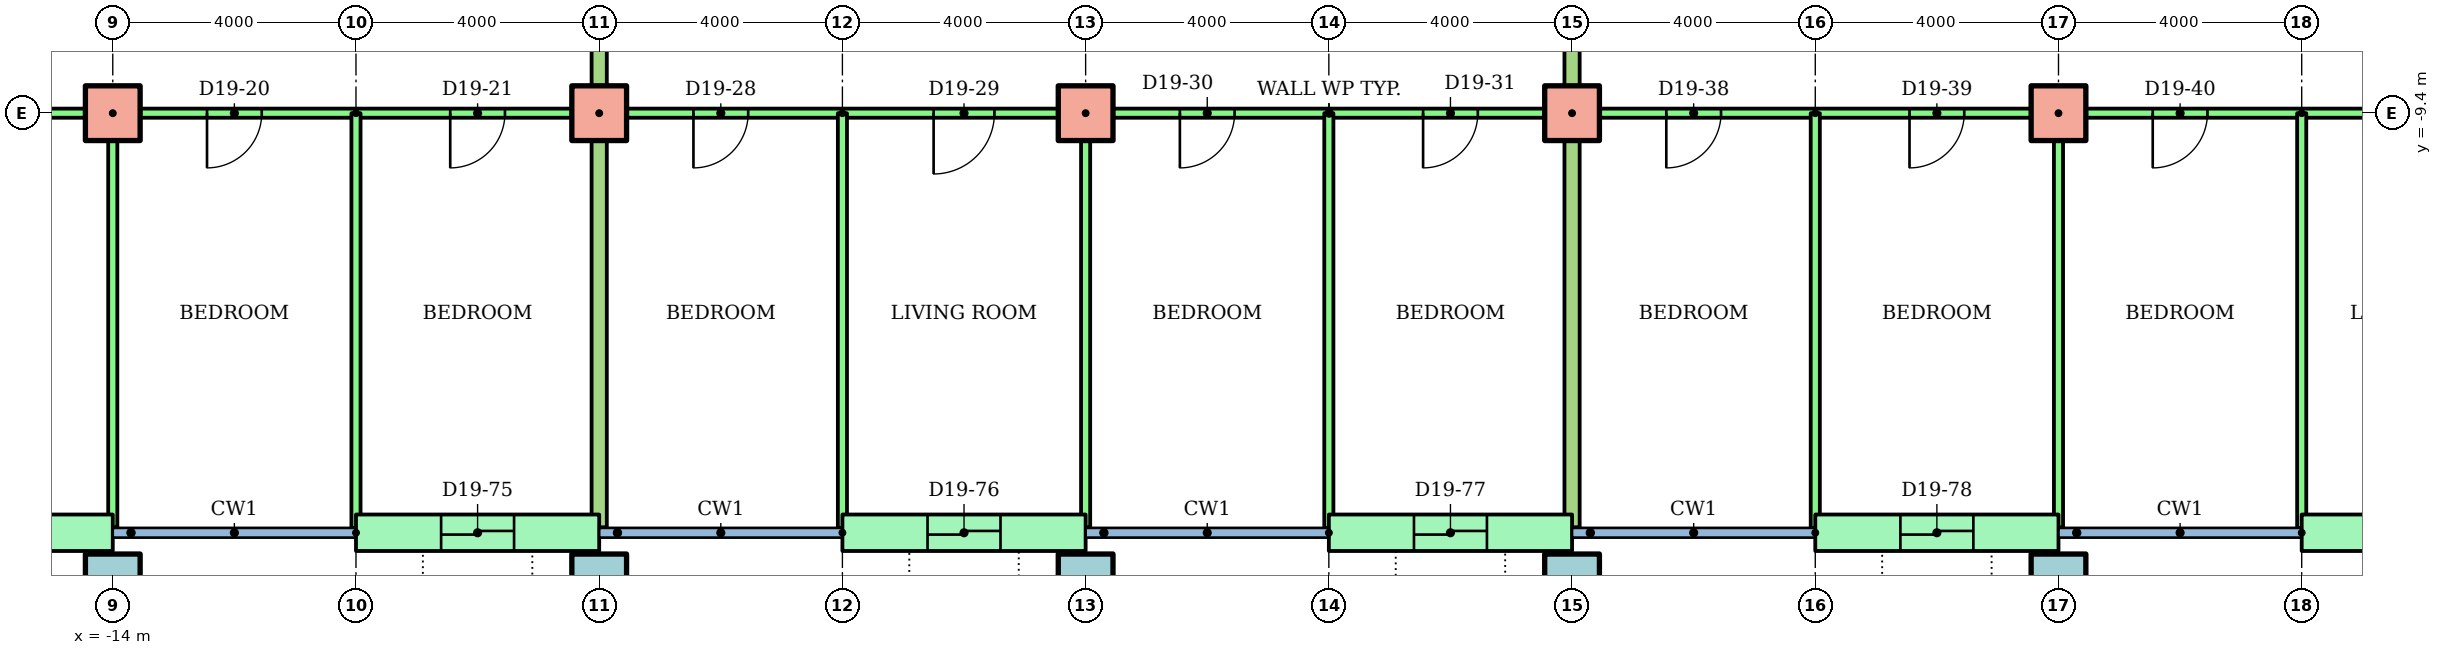
"""IFC4 building model, lengths in metres.
Left out: names, types, materials, properties, quantities, classifications, styles, units other than length and angle.
Written with IfcOpenShell. Run it as: python <this file> out.ifc"""

import sys

from ifc_helpers import new_model, si_unit, direction, frame, frame_2d, origin, origin_2d, place, context, subcontext, project, spatial, rectangle, hollow_rectangle, extrude, element, fill, save


model = new_model("IFC4")
c1 = context("Model", 3, precision=1e-05, world=origin(), true_north=direction((0.0, 1.0)))
c2 = subcontext(c1, "Body", "Model", "MODEL_VIEW")
j1 = project(units=[si_unit("LENGTHUNIT", "METRE"), si_unit("PLANEANGLEUNIT", "RADIAN")], contexts=[c1])
p1 = place(None, origin())
s1 = spatial("IfcSite", under=j1, at=p1, CompositionType="ELEMENT")
p2 = place(p1, origin())
s2 = spatial("IfcBuilding", under=s1, at=p2, CompositionType="ELEMENT")
p3 = place(p2, frame((0.0, 0.0, 77.5)))
s3 = spatial("IfcBuildingStorey", under=s2, at=p3, CompositionType="ELEMENT", Elevation=77.5)
for number, where in (
    (1, (-14.0, -17.1, 0.0)),
    (2, (-6.0, -17.1, 0.0)),
    (3, (2.0, -17.1, 0.0)),
    (4, (10.0, -17.1, 0.0)),
    (5, (18.0, -17.1, 0.0)),
):
    element("IfcColumn", number, at=place(p3, frame(where)), inside=s3, PredefinedType="COLUMN", context=c2, shape_type="SweptSolid", body=[
        extrude(hollow_rectangle(XDim=0.9, YDim=0.9, WallThickness=0.045, at=origin_2d()), origin(), (0.0, 0.0, 1.0), 3.2),
    ])
for number, where in (
    (6, (-14.0, -9.4, 0.0)),
    (7, (-6.0, -9.4, 0.0)),
    (8, (2.0, -9.4, 0.0)),
    (9, (10.0, -9.4, 0.0)),
    (10, (18.0, -9.4, 0.0)),
):
    element("IfcColumn", number, at=place(p3, frame(where)), inside=s3, PredefinedType="COLUMN", context=c2, shape_type="SweptSolid", body=[
        extrude(rectangle(XDim=0.9, YDim=0.9, at=origin_2d()), origin(), (0.0, 0.0, 1.0), 3.2),
    ])
p4 = place(p3, frame((-18.0, -16.3, 0.0)))
e11 = element("IfcWall", 11, at=p4, inside=s3, PredefinedType="STANDARD", context=c2, shape_type="SweptSolid", body=[
    extrude(rectangle(XDim=4.0, YDim=0.6, at=frame_2d((2.0, 0.0))), origin(), (0.0, 0.0, 1.0), 2.92),
])
p5 = place(p4, frame((1.4, 0.0, 0.0)))
e12 = element("IfcOpeningElement", 12, at=p5, cuts=e11, PredefinedType="OPENING", context=c2, shape_type="SweptSolid", body=[
    extrude(rectangle(XDim=1.2, YDim=2.1, at=frame_2d((0.6, 1.05))), frame((0.0, 0.31, 0.0), z_axis=(0.0, -1.0, 0.0), x_axis=(1.0, 0.0, 0.0)), (0.0, 0.0, 1.0), 0.62),
])
p6 = place(p3, frame((-10.0, -16.3, 0.0)))
e13 = element("IfcWall", 13, at=p6, inside=s3, PredefinedType="STANDARD", context=c2, shape_type="SweptSolid", body=[
    extrude(rectangle(XDim=4.0, YDim=0.6, at=frame_2d((2.0, 0.0))), origin(), (0.0, 0.0, 1.0), 2.92),
])
p7 = place(p6, frame((1.4, 0.0, 0.0)))
e14 = element("IfcOpeningElement", 14, at=p7, cuts=e13, PredefinedType="OPENING", context=c2, shape_type="SweptSolid", body=[
    extrude(rectangle(XDim=1.2, YDim=2.1, at=frame_2d((0.6, 1.05))), frame((0.0, 0.31, 0.0), z_axis=(0.0, -1.0, 0.0), x_axis=(1.0, 0.0, 0.0)), (0.0, 0.0, 1.0), 0.62),
])
p8 = place(p3, frame((-2.0, -16.3, 0.0)))
e15 = element("IfcWall", 15, at=p8, inside=s3, PredefinedType="STANDARD", context=c2, shape_type="SweptSolid", body=[
    extrude(rectangle(XDim=4.0, YDim=0.6, at=frame_2d((2.0, 0.0))), origin(), (0.0, 0.0, 1.0), 2.92),
])
p9 = place(p8, frame((1.4, 0.0, 0.0)))
e16 = element("IfcOpeningElement", 16, at=p9, cuts=e15, PredefinedType="OPENING", context=c2, shape_type="SweptSolid", body=[
    extrude(rectangle(XDim=1.2, YDim=2.1, at=frame_2d((0.6, 1.05))), frame((0.0, 0.31, 0.0), z_axis=(0.0, -1.0, 0.0), x_axis=(1.0, 0.0, 0.0)), (0.0, 0.0, 1.0), 0.62),
])
p10 = place(p3, frame((6.0, -16.3, 0.0)))
e17 = element("IfcWall", 17, at=p10, inside=s3, PredefinedType="STANDARD", context=c2, shape_type="SweptSolid", body=[
    extrude(rectangle(XDim=4.0, YDim=0.6, at=frame_2d((2.0, 0.0))), origin(), (0.0, 0.0, 1.0), 2.92),
])
p11 = place(p10, frame((1.4, 0.0, 0.0)))
e18 = element("IfcOpeningElement", 18, at=p11, cuts=e17, PredefinedType="OPENING", context=c2, shape_type="SweptSolid", body=[
    extrude(rectangle(XDim=1.2, YDim=2.1, at=frame_2d((0.6, 1.05))), frame((0.0, 0.31, 0.0), z_axis=(0.0, -1.0, 0.0), x_axis=(1.0, 0.0, 0.0)), (0.0, 0.0, 1.0), 0.62),
])
p12 = place(p3, frame((14.0, -16.3, 0.0)))
e19 = element("IfcWall", 19, at=p12, inside=s3, PredefinedType="STANDARD", context=c2, shape_type="SweptSolid", body=[
    extrude(rectangle(XDim=4.0, YDim=0.6, at=frame_2d((2.0, 0.0))), origin(), (0.0, 0.0, 1.0), 2.92),
])
p13 = place(p12, frame((1.4, 0.0, 0.0)))
e20 = element("IfcOpeningElement", 20, at=p13, cuts=e19, PredefinedType="OPENING", context=c2, shape_type="SweptSolid", body=[
    extrude(rectangle(XDim=1.2, YDim=2.1, at=frame_2d((0.6, 1.05))), frame((0.0, 0.31, 0.0), z_axis=(0.0, -1.0, 0.0), x_axis=(1.0, 0.0, 0.0)), (0.0, 0.0, 1.0), 0.62),
])
p14 = place(p3, frame((22.0, -16.3, 0.0)))
e21 = element("IfcWall", 21, at=p14, inside=s3, PredefinedType="STANDARD", context=c2, shape_type="SweptSolid", body=[
    extrude(rectangle(XDim=4.0, YDim=0.6, at=frame_2d((2.0, 0.0))), origin(), (0.0, 0.0, 1.0), 2.92),
])
p15 = place(p14, frame((1.4, 0.0, 0.0)))
e22 = element("IfcOpeningElement", 22, at=p15, cuts=e21, PredefinedType="OPENING", context=c2, shape_type="SweptSolid", body=[
    extrude(rectangle(XDim=1.2, YDim=2.1, at=frame_2d((0.6, 1.05))), frame((0.0, 0.31, 0.0), z_axis=(0.0, -1.0, 0.0), x_axis=(1.0, 0.0, 0.0)), (0.0, 0.0, 1.0), 0.62),
])
p16 = place(p3, frame((-6.0, -9.4, 0.0), z_axis=(0.0, 0.0, 1.0), x_axis=(-1.0, 0.0, 0.0)))
e23 = element("IfcWall", 23, at=p16, inside=s3, PredefinedType="PARTITIONING", context=c2, shape_type="SweptSolid", body=[
    extrude(rectangle(XDim=22.61, YDim=0.15, at=frame_2d((11.305, 0.0))), origin(), (0.0, 0.0, 1.0), 2.4),
])
p17 = place(p16, frame((19.7, 0.0, 0.0)))
e24 = element("IfcOpeningElement", 24, at=p17, cuts=e23, PredefinedType="OPENING", context=c2, shape_type="SweptSolid", body=[
    extrude(rectangle(XDim=0.9, YDim=2.1, at=frame_2d((0.45, 1.05))), frame((0.0, 0.085, 0.0), z_axis=(0.0, -1.0, 0.0), x_axis=(1.0, 0.0, 0.0)), (0.0, 0.0, 1.0), 0.17),
])
p18 = place(p16, frame((12.45, 0.0, 0.0)))
e25 = element("IfcOpeningElement", 25, at=p18, cuts=e23, PredefinedType="OPENING", context=c2, shape_type="SweptSolid", body=[
    extrude(rectangle(XDim=1.0, YDim=2.1, at=frame_2d((0.5, 1.05))), frame((0.0, 0.085, 0.0), z_axis=(0.0, -1.0, 0.0), x_axis=(1.0, 0.0, 0.0)), (0.0, 0.0, 1.0), 0.17),
])
p19 = place(p16, frame((5.55, 0.0, 0.0)))
e26 = element("IfcOpeningElement", 26, at=p19, cuts=e23, PredefinedType="OPENING", context=c2, shape_type="SweptSolid", body=[
    extrude(rectangle(XDim=0.9, YDim=2.1, at=frame_2d((0.45, 1.05))), frame((0.0, 0.085, 0.0), z_axis=(0.0, -1.0, 0.0), x_axis=(1.0, 0.0, 0.0)), (0.0, 0.0, 1.0), 0.17),
])
p20 = place(p16, frame((1.55, 0.0, 0.0)))
e27 = element("IfcOpeningElement", 27, at=p20, cuts=e23, PredefinedType="OPENING", context=c2, shape_type="SweptSolid", body=[
    extrude(rectangle(XDim=0.9, YDim=2.1, at=frame_2d((0.45, 1.05))), frame((0.0, 0.085, 0.0), z_axis=(0.0, -1.0, 0.0), x_axis=(1.0, 0.0, 0.0)), (0.0, 0.0, 1.0), 0.17),
])
p21 = place(p3, frame((-14.0, -9.4, 0.0), z_axis=(0.0, 0.0, 1.0), x_axis=(0.0, -1.0, 0.0)))
e28 = element("IfcWall", 28, at=p21, inside=s3, PredefinedType="PARTITIONING", context=c2, shape_type="SweptSolid", body=[
    extrude(rectangle(XDim=6.81, YDim=0.15, at=frame_2d((3.405, 0.0))), origin(), (0.0, 0.0, 1.0), 2.4),
])
p22 = place(p3, frame((-10.0, -9.4, 0.0), z_axis=(0.0, 0.0, 1.0), x_axis=(0.0, -1.0, 0.0)))
e29 = element("IfcWall", 29, at=p22, inside=s3, PredefinedType="PARTITIONING", context=c2, shape_type="SweptSolid", body=[
    extrude(rectangle(XDim=6.821, YDim=0.15, at=frame_2d((3.411, 0.0))), origin(), (0.0, 0.0, 1.0), 2.4),
])
p23 = place(p3, frame((10.0, -9.4, 0.0), z_axis=(0.0, 0.0, 1.0), x_axis=(-1.0, 0.0, 0.0)))
e30 = element("IfcWall", 30, at=p23, inside=s3, PredefinedType="PARTITIONING", context=c2, shape_type="SweptSolid", body=[
    extrude(rectangle(XDim=16.0, YDim=0.15, at=frame_2d((8.0, 0.0))), origin(), (0.0, 0.0, 1.0), 2.4),
])
p24 = place(p23, frame((13.55, 0.0, 0.0)))
e31 = element("IfcOpeningElement", 31, at=p24, cuts=e30, PredefinedType="OPENING", context=c2, shape_type="SweptSolid", body=[
    extrude(rectangle(XDim=0.9, YDim=2.1, at=frame_2d((0.45, 1.05))), frame((0.0, 0.085, 0.0), z_axis=(0.0, -1.0, 0.0), x_axis=(1.0, 0.0, 0.0)), (0.0, 0.0, 1.0), 0.17),
])
p25 = place(p23, frame((9.5, 0.0, 0.0)))
e32 = element("IfcOpeningElement", 32, at=p25, cuts=e30, PredefinedType="OPENING", context=c2, shape_type="SweptSolid", body=[
    extrude(rectangle(XDim=1.0, YDim=2.1, at=frame_2d((0.5, 1.05))), frame((0.0, 0.085, 0.0), z_axis=(0.0, -1.0, 0.0), x_axis=(1.0, 0.0, 0.0)), (0.0, 0.0, 1.0), 0.17),
])
p26 = place(p23, frame((5.55, 0.0, 0.0)))
e33 = element("IfcOpeningElement", 33, at=p26, cuts=e30, PredefinedType="OPENING", context=c2, shape_type="SweptSolid", body=[
    extrude(rectangle(XDim=0.9, YDim=2.1, at=frame_2d((0.45, 1.05))), frame((0.0, 0.085, 0.0), z_axis=(0.0, -1.0, 0.0), x_axis=(1.0, 0.0, 0.0)), (0.0, 0.0, 1.0), 0.17),
])
p27 = place(p23, frame((1.55, 0.0, 0.0)))
e34 = element("IfcOpeningElement", 34, at=p27, cuts=e30, PredefinedType="OPENING", context=c2, shape_type="SweptSolid", body=[
    extrude(rectangle(XDim=0.9, YDim=2.1, at=frame_2d((0.45, 1.05))), frame((0.0, 0.085, 0.0), z_axis=(0.0, -1.0, 0.0), x_axis=(1.0, 0.0, 0.0)), (0.0, 0.0, 1.0), 0.17),
])
p28 = place(p3, frame((-2.0, -9.4, 0.0), z_axis=(0.0, 0.0, 1.0), x_axis=(0.0, -1.0, 0.0)))
e35 = element("IfcWall", 35, at=p28, inside=s3, PredefinedType="PARTITIONING", context=c2, shape_type="SweptSolid", body=[
    extrude(rectangle(XDim=6.821, YDim=0.15, at=frame_2d((3.411, 0.0))), origin(), (0.0, 0.0, 1.0), 2.4),
])
p29 = place(p3, frame((2.0, -9.4, 0.0), z_axis=(0.0, 0.0, 1.0), x_axis=(0.0, -1.0, 0.0)))
e36 = element("IfcWall", 36, at=p29, inside=s3, PredefinedType="PARTITIONING", context=c2, shape_type="SweptSolid", body=[
    extrude(rectangle(XDim=6.81, YDim=0.15, at=frame_2d((3.405, 0.0))), origin(), (0.0, 0.0, 1.0), 2.4),
])
p30 = place(p3, frame((6.0, -9.4, 0.0), z_axis=(0.0, 0.0, 1.0), x_axis=(0.0, -1.0, 0.0)))
e37 = element("IfcWall", 37, at=p30, inside=s3, PredefinedType="PARTITIONING", context=c2, shape_type="SweptSolid", body=[
    extrude(rectangle(XDim=6.821, YDim=0.15, at=frame_2d((3.411, 0.0))), origin(), (0.0, 0.0, 1.0), 2.4),
])
p31 = place(p3, frame((-6.0, -1.4, 0.0), z_axis=(0.0, 0.0, 1.0), x_axis=(0.0, -1.0, 0.0)))
e38 = element("IfcWall", 38, at=p31, inside=s3, PredefinedType="PARTITIONING", context=c2, shape_type="SweptSolid", body=[
    extrude(rectangle(XDim=14.81, YDim=0.25, at=frame_2d((7.405, 0.0))), origin(), (0.0, 0.0, 1.0), 2.4),
])
p32 = place(p3, frame((26.0, -9.4, 0.0), z_axis=(0.0, 0.0, 1.0), x_axis=(-1.0, 0.0, 0.0)))
e39 = element("IfcWall", 39, at=p32, inside=s3, PredefinedType="PARTITIONING", context=c2, shape_type="SweptSolid", body=[
    extrude(rectangle(XDim=16.0, YDim=0.15, at=frame_2d((8.0, 0.0))), origin(), (0.0, 0.0, 1.0), 2.4),
])
p33 = place(p32, frame((13.55, 0.0, 0.0)))
e40 = element("IfcOpeningElement", 40, at=p33, cuts=e39, PredefinedType="OPENING", context=c2, shape_type="SweptSolid", body=[
    extrude(rectangle(XDim=0.9, YDim=2.1, at=frame_2d((0.45, 1.05))), frame((0.0, 0.085, 0.0), z_axis=(0.0, -1.0, 0.0), x_axis=(1.0, 0.0, 0.0)), (0.0, 0.0, 1.0), 0.17),
])
p34 = place(p32, frame((9.55, 0.0, 0.0)))
e41 = element("IfcOpeningElement", 41, at=p34, cuts=e39, PredefinedType="OPENING", context=c2, shape_type="SweptSolid", body=[
    extrude(rectangle(XDim=0.9, YDim=2.1, at=frame_2d((0.45, 1.05))), frame((0.0, 0.085, 0.0), z_axis=(0.0, -1.0, 0.0), x_axis=(1.0, 0.0, 0.0)), (0.0, 0.0, 1.0), 0.17),
])
p35 = place(p32, frame((5.55, 0.0, 0.0)))
e42 = element("IfcOpeningElement", 42, at=p35, cuts=e39, PredefinedType="OPENING", context=c2, shape_type="SweptSolid", body=[
    extrude(rectangle(XDim=0.9, YDim=2.1, at=frame_2d((0.45, 1.05))), frame((0.0, 0.085, 0.0), z_axis=(0.0, -1.0, 0.0), x_axis=(1.0, 0.0, 0.0)), (0.0, 0.0, 1.0), 0.17),
])
p36 = place(p32, frame((1.5, 0.0, 0.0)))
e43 = element("IfcOpeningElement", 43, at=p36, cuts=e39, PredefinedType="OPENING", context=c2, shape_type="SweptSolid", body=[
    extrude(rectangle(XDim=1.0, YDim=2.1, at=frame_2d((0.5, 1.05))), frame((0.0, 0.085, 0.0), z_axis=(0.0, -1.0, 0.0), x_axis=(1.0, 0.0, 0.0)), (0.0, 0.0, 1.0), 0.17),
])
p37 = place(p3, frame((14.0, -9.4, 0.0), z_axis=(0.0, 0.0, 1.0), x_axis=(0.0, -1.0, 0.0)))
e44 = element("IfcWall", 44, at=p37, inside=s3, PredefinedType="PARTITIONING", context=c2, shape_type="SweptSolid", body=[
    extrude(rectangle(XDim=6.821, YDim=0.15, at=frame_2d((3.411, 0.0))), origin(), (0.0, 0.0, 1.0), 2.4),
])
p38 = place(p3, frame((18.0, -9.4, 0.0), z_axis=(0.0, 0.0, 1.0), x_axis=(0.0, -1.0, 0.0)))
e45 = element("IfcWall", 45, at=p38, inside=s3, PredefinedType="PARTITIONING", context=c2, shape_type="SweptSolid", body=[
    extrude(rectangle(XDim=6.81, YDim=0.15, at=frame_2d((3.405, 0.0))), origin(), (0.0, 0.0, 1.0), 2.4),
])
p39 = place(p3, frame((22.0, -9.4, 0.0), z_axis=(0.0, 0.0, 1.0), x_axis=(0.0, -1.0, 0.0)))
e46 = element("IfcWall", 46, at=p39, inside=s3, PredefinedType="PARTITIONING", context=c2, shape_type="SweptSolid", body=[
    extrude(rectangle(XDim=6.821, YDim=0.15, at=frame_2d((3.411, 0.0))), origin(), (0.0, 0.0, 1.0), 2.4),
])
p40 = place(p3, frame((10.0, -1.4, 0.0), z_axis=(0.0, 0.0, 1.0), x_axis=(0.0, -1.0, 0.0)))
e47 = element("IfcWall", 47, at=p40, inside=s3, PredefinedType="PARTITIONING", context=c2, shape_type="SweptSolid", body=[
    extrude(rectangle(XDim=14.81, YDim=0.25, at=frame_2d((7.405, 0.0))), origin(), (0.0, 0.0, 1.0), 2.4),
])
p41 = place(p19, origin())
e48 = element("IfcDoor", 48, at=p41, inside=s3, OperationType="SINGLE_SWING_RIGHT", PredefinedType="DOOR", context=c2, shape_type="SweptSolid", body=[
    extrude(rectangle(XDim=0.9, YDim=2.1, at=frame_2d((0.45, 1.05))), frame((0.0, 0.025, 0.0), z_axis=(0.0, -1.0, 0.0), x_axis=(1.0, 0.0, 0.0)), (0.0, 0.0, 1.0), 0.05),
])
fill(e26, e48)
p42 = place(p20, origin())
e49 = element("IfcDoor", 49, at=p42, inside=s3, OperationType="SINGLE_SWING_RIGHT", PredefinedType="DOOR", context=c2, shape_type="SweptSolid", body=[
    extrude(rectangle(XDim=0.9, YDim=2.1, at=frame_2d((0.45, 1.05))), frame((0.0, 0.025, 0.0), z_axis=(0.0, -1.0, 0.0), x_axis=(1.0, 0.0, 0.0)), (0.0, 0.0, 1.0), 0.05),
])
fill(e27, e49)
p43 = place(p24, origin())
e50 = element("IfcDoor", 50, at=p43, inside=s3, OperationType="SINGLE_SWING_RIGHT", PredefinedType="DOOR", context=c2, shape_type="SweptSolid", body=[
    extrude(rectangle(XDim=0.9, YDim=2.1, at=frame_2d((0.45, 1.05))), frame((0.0, 0.025, 0.0), z_axis=(0.0, -1.0, 0.0), x_axis=(1.0, 0.0, 0.0)), (0.0, 0.0, 1.0), 0.05),
])
fill(e31, e50)
p44 = place(p25, origin())
e51 = element("IfcDoor", 51, at=p44, inside=s3, OperationType="SINGLE_SWING_RIGHT", PredefinedType="DOOR", context=c2, shape_type="SweptSolid", body=[
    extrude(rectangle(XDim=1.0, YDim=2.1, at=frame_2d((0.5, 1.05))), frame((0.0, 0.025, 0.0), z_axis=(0.0, -1.0, 0.0), x_axis=(1.0, 0.0, 0.0)), (0.0, 0.0, 1.0), 0.05),
])
fill(e32, e51)
p45 = place(p26, origin())
e52 = element("IfcDoor", 52, at=p45, inside=s3, OperationType="SINGLE_SWING_RIGHT", PredefinedType="DOOR", context=c2, shape_type="SweptSolid", body=[
    extrude(rectangle(XDim=0.9, YDim=2.1, at=frame_2d((0.45, 1.05))), frame((0.0, 0.025, 0.0), z_axis=(0.0, -1.0, 0.0), x_axis=(1.0, 0.0, 0.0)), (0.0, 0.0, 1.0), 0.05),
])
fill(e33, e52)
p46 = place(p27, origin())
e53 = element("IfcDoor", 53, at=p46, inside=s3, OperationType="SINGLE_SWING_RIGHT", PredefinedType="DOOR", context=c2, shape_type="SweptSolid", body=[
    extrude(rectangle(XDim=0.9, YDim=2.1, at=frame_2d((0.45, 1.05))), frame((0.0, 0.025, 0.0), z_axis=(0.0, -1.0, 0.0), x_axis=(1.0, 0.0, 0.0)), (0.0, 0.0, 1.0), 0.05),
])
fill(e34, e53)
p47 = place(p33, origin())
e54 = element("IfcDoor", 54, at=p47, inside=s3, OperationType="SINGLE_SWING_RIGHT", PredefinedType="DOOR", context=c2, shape_type="SweptSolid", body=[
    extrude(rectangle(XDim=0.9, YDim=2.1, at=frame_2d((0.45, 1.05))), frame((0.0, 0.025, 0.0), z_axis=(0.0, -1.0, 0.0), x_axis=(1.0, 0.0, 0.0)), (0.0, 0.0, 1.0), 0.05),
])
fill(e40, e54)
p48 = place(p34, origin())
e55 = element("IfcDoor", 55, at=p48, inside=s3, OperationType="SINGLE_SWING_RIGHT", PredefinedType="DOOR", context=c2, shape_type="SweptSolid", body=[
    extrude(rectangle(XDim=0.9, YDim=2.1, at=frame_2d((0.45, 1.05))), frame((0.0, 0.025, 0.0), z_axis=(0.0, -1.0, 0.0), x_axis=(1.0, 0.0, 0.0)), (0.0, 0.0, 1.0), 0.05),
])
fill(e41, e55)
p49 = place(p35, origin())
e56 = element("IfcDoor", 56, at=p49, inside=s3, OperationType="SINGLE_SWING_RIGHT", PredefinedType="DOOR", context=c2, shape_type="SweptSolid", body=[
    extrude(rectangle(XDim=0.9, YDim=2.1, at=frame_2d((0.45, 1.05))), frame((0.0, 0.025, 0.0), z_axis=(0.0, -1.0, 0.0), x_axis=(1.0, 0.0, 0.0)), (0.0, 0.0, 1.0), 0.05),
])
fill(e42, e56)
p50 = place(p7, origin())
e57 = element("IfcDoor", 57, at=p50, inside=s3, OperationType="SLIDING_TO_LEFT", PredefinedType="DOOR", context=c2, shape_type="SweptSolid", body=[
    extrude(rectangle(XDim=1.2, YDim=2.1, at=frame_2d((0.6, 1.05))), frame((0.0, 0.025, 0.0), z_axis=(0.0, -1.0, 0.0), x_axis=(1.0, 0.0, 0.0)), (0.0, 0.0, 1.0), 0.05),
])
fill(e14, e57)
p51 = place(p9, origin())
e58 = element("IfcDoor", 58, at=p51, inside=s3, OperationType="SLIDING_TO_LEFT", PredefinedType="DOOR", context=c2, shape_type="SweptSolid", body=[
    extrude(rectangle(XDim=1.2, YDim=2.1, at=frame_2d((0.6, 1.05))), frame((0.0, 0.025, 0.0), z_axis=(0.0, -1.0, 0.0), x_axis=(1.0, 0.0, 0.0)), (0.0, 0.0, 1.0), 0.05),
])
fill(e16, e58)
p52 = place(p11, origin())
e59 = element("IfcDoor", 59, at=p52, inside=s3, OperationType="SLIDING_TO_LEFT", PredefinedType="DOOR", context=c2, shape_type="SweptSolid", body=[
    extrude(rectangle(XDim=1.2, YDim=2.1, at=frame_2d((0.6, 1.05))), frame((0.0, 0.025, 0.0), z_axis=(0.0, -1.0, 0.0), x_axis=(1.0, 0.0, 0.0)), (0.0, 0.0, 1.0), 0.05),
])
fill(e18, e59)
p53 = place(p13, origin())
e60 = element("IfcDoor", 60, at=p53, inside=s3, OperationType="SLIDING_TO_LEFT", PredefinedType="DOOR", context=c2, shape_type="SweptSolid", body=[
    extrude(rectangle(XDim=1.2, YDim=2.1, at=frame_2d((0.6, 1.05))), frame((0.0, 0.025, 0.0), z_axis=(0.0, -1.0, 0.0), x_axis=(1.0, 0.0, 0.0)), (0.0, 0.0, 1.0), 0.05),
])
fill(e20, e60)
save(model, sys.argv[1])
